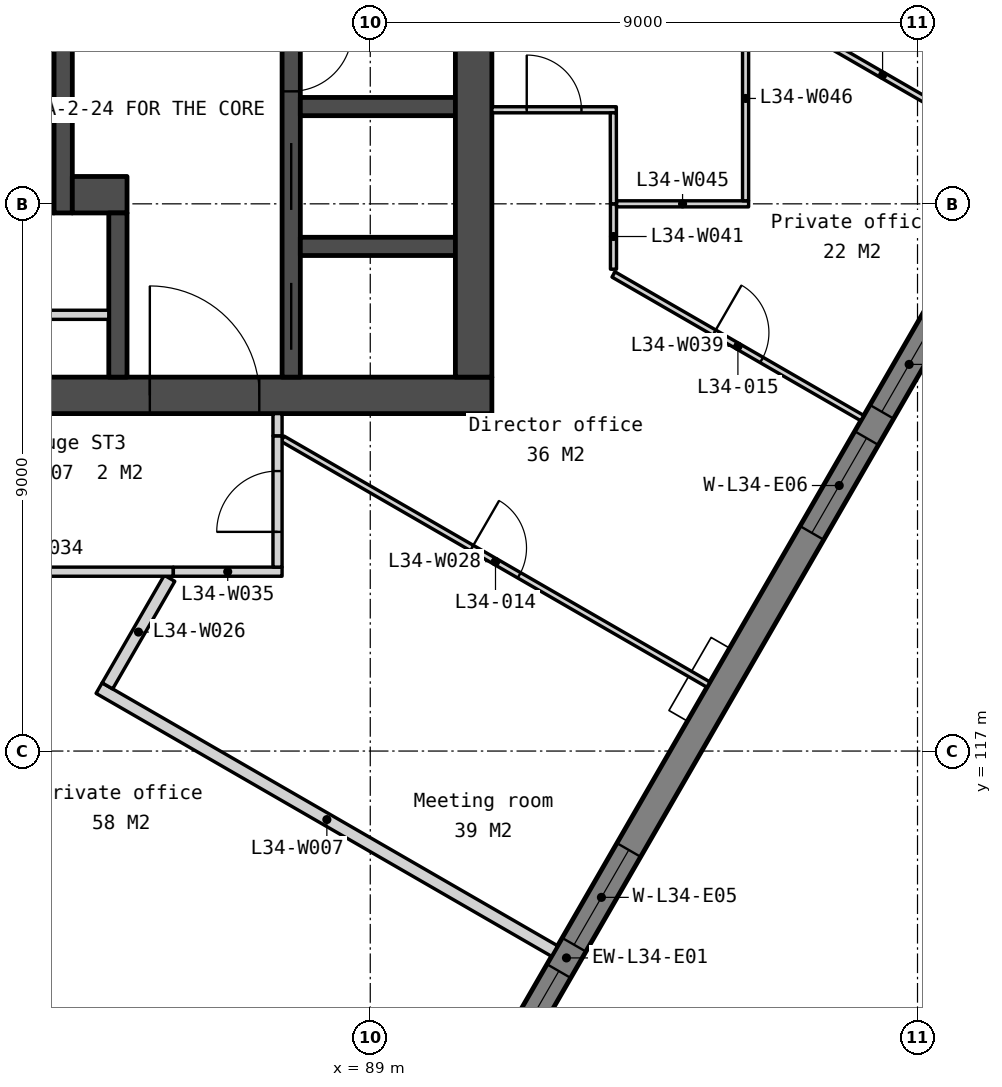
"""IFC4 building model, lengths in metres.
Left out: names, types, materials, properties, quantities, classifications, styles, units other than length and angle.
Written with IfcOpenShell. Run it as: python <this file> out.ifc"""

import sys

from ifc_helpers import new_model, si_unit, direction, frame, frame_2d, origin, place, context, subcontext, project, spatial, polyline, rectangle, outline, extrude, element, fill, save


model = new_model("IFC4")
c1 = context("Model", 3, precision=1e-05, world=origin(), true_north=direction((0.0, 1.0)))
c2 = subcontext(c1, "Body", "Model", "MODEL_VIEW")
j1 = project(units=[si_unit("LENGTHUNIT", "METRE"), si_unit("PLANEANGLEUNIT", "RADIAN")], contexts=[c1])
p1 = place(None, origin())
s1 = spatial("IfcSite", under=j1, at=p1, CompositionType="ELEMENT")
p2 = place(p1, origin())
s2 = spatial("IfcBuilding", under=s1, at=p2, CompositionType="ELEMENT")
p3 = place(p2, frame((0.0, 0.0, 136.4)))
s3 = spatial("IfcBuildingStorey", under=s2, at=p3, CompositionType="ELEMENT", Elevation=136.4)
p4 = place(p3, frame((69.0, 122.85, 0.0), z_axis=(0.0, 0.0, 1.0), x_axis=(1.0, 0.0, 0.0)))
e1 = element("IfcWall", 1, at=p4, inside=s3, PredefinedType="SOLIDWALL", context=c2, shape_type="SweptSolid", body=[
    extrude(rectangle(XDim=22.0, YDim=0.6, at=frame_2d((11.0, 0.0))), origin(), (0.0, 0.0, 1.0), 3.75),
])
p5 = place(p4, frame((16.375, 0.0, 0.0)))
e2 = element("IfcOpeningElement", 2, at=p5, cuts=e1, PredefinedType="OPENING", context=c2, shape_type="SweptSolid", body=[
    extrude(rectangle(XDim=1.8, YDim=2.1, at=frame_2d((0.9, 1.05))), frame((0.0, 0.31, 0.0), z_axis=(0.0, -1.0, 0.0), x_axis=(1.0, 0.0, 0.0)), (0.0, 0.0, 1.0), 0.62),
])
p6 = place(p4, frame((3.825, 0.0, 0.0)))
e3 = element("IfcOpeningElement", 3, at=p6, cuts=e1, PredefinedType="OPENING", context=c2, shape_type="SweptSolid", body=[
    extrude(rectangle(XDim=1.8, YDim=2.1, at=frame_2d((0.9, 1.05))), frame((0.0, 0.31, 0.0), z_axis=(0.0, -1.0, 0.0), x_axis=(1.0, 0.0, 0.0)), (0.0, 0.0, 1.0), 0.62),
])
p7 = place(p4, frame((12.85, 0.0, 0.0)))
e4 = element("IfcOpeningElement", 4, at=p7, cuts=e1, PredefinedType="OPENING", context=c2, shape_type="SweptSolid", body=[
    extrude(rectangle(XDim=1.5, YDim=2.1, at=frame_2d((0.75, 1.05))), frame((0.0, 0.31, 0.0), z_axis=(0.0, -1.0, 0.0), x_axis=(1.0, 0.0, 0.0)), (0.0, 0.0, 1.0), 0.62),
])
p8 = place(p3, frame((82.9, 126.15, 0.0), z_axis=(0.0, 0.0, 1.0), x_axis=(1.0, 0.0, 0.0)))
e5 = element("IfcWall", 5, at=p8, inside=s3, PredefinedType="SOLIDWALL", context=c2, shape_type="SweptSolid", body=[
    extrude(rectangle(XDim=0.9, YDim=0.6, at=frame_2d((0.45, 0.0))), origin(), (0.0, 0.0, 1.0), 3.75),
])
p9 = place(p3, frame((83.35, 124.175, 0.0), z_axis=(0.0, 0.0, 1.0), x_axis=(1.0, 0.0, 0.0)))
e6 = element("IfcWall", 6, at=p9, inside=s3, PredefinedType="PARTITIONING", context=c2, shape_type="SweptSolid", body=[
    extrude(rectangle(XDim=1.35, YDim=0.15, at=frame_2d((0.675, 0.0))), origin(), (0.0, 0.0, 1.0), 3.75),
])
p10 = place(p3, frame((83.95, 133.95, 0.0), z_axis=(0.0, 0.0, 1.0), x_axis=(0.0, -1.0, 0.0)))
e7 = element("IfcWall", 7, at=p10, inside=s3, PredefinedType="SOLIDWALL", context=c2, shape_type="SweptSolid", body=[
    extrude(rectangle(XDim=8.1, YDim=0.3, at=frame_2d((4.05, 0.0))), origin(), (0.0, 0.0, 1.0), 3.75),
])
p11 = place(p3, frame((84.1, 126.15, 0.0), z_axis=(0.0, 0.0, 1.0), x_axis=(1.0, 0.0, 0.0)))
e8 = element("IfcWall", 8, at=p11, inside=s3, PredefinedType="SOLIDWALL", context=c2, shape_type="SweptSolid", body=[
    extrude(rectangle(XDim=0.9, YDim=0.6, at=frame_2d((0.45, 0.0))), origin(), (0.0, 0.0, 1.0), 3.75),
])
p12 = place(p3, frame((84.85, 125.85, 0.0), z_axis=(0.0, 0.0, 1.0), x_axis=(0.0, -1.0, 0.0)))
e9 = element("IfcWall", 9, at=p12, inside=s3, PredefinedType="SOLIDWALL", context=c2, shape_type="SweptSolid", body=[
    extrude(rectangle(XDim=2.7, YDim=0.3, at=frame_2d((1.35, 0.0))), origin(), (0.0, 0.0, 1.0), 3.75),
])
p13 = place(p3, frame((87.7, 133.95, 0.0), z_axis=(0.0, 0.0, 1.0), x_axis=(0.0, -1.0, 0.0)))
e10 = element("IfcWall", 10, at=p13, inside=s3, PredefinedType="SOLIDWALL", context=c2, shape_type="SweptSolid", body=[
    extrude(rectangle(XDim=10.8, YDim=0.3, at=frame_2d((5.4, 0.0))), origin(), (0.0, 0.0, 1.0), 3.75),
])
p14 = place(p13, frame((6.95, 0.0, 0.0)))
e11 = element("IfcOpeningElement", 11, at=p14, cuts=e10, PredefinedType="OPENING", context=c2, shape_type="SweptSolid", body=[
    extrude(rectangle(XDim=1.1, YDim=2.1, at=frame_2d((0.55, 1.05))), frame((0.0, 0.16, 0.0), z_axis=(0.0, -1.0, 0.0), x_axis=(1.0, 0.0, 0.0)), (0.0, 0.0, 1.0), 0.32),
])
p15 = place(p13, frame((5.1, 0.0, 0.0)))
e12 = element("IfcOpeningElement", 12, at=p15, cuts=e10, PredefinedType="OPENING", context=c2, shape_type="SweptSolid", body=[
    extrude(rectangle(XDim=1.0, YDim=2.1, at=frame_2d((0.5, 1.05))), frame((0.0, 0.16, 0.0), z_axis=(0.0, -1.0, 0.0), x_axis=(1.0, 0.0, 0.0)), (0.0, 0.0, 1.0), 0.32),
])
p16 = place(p13, frame((9.25, 0.0, 0.0)))
e13 = element("IfcOpeningElement", 13, at=p16, cuts=e10, PredefinedType="OPENING", context=c2, shape_type="SweptSolid", body=[
    extrude(rectangle(XDim=1.1, YDim=2.1, at=frame_2d((0.55, 1.05))), frame((0.0, 0.16, 0.0), z_axis=(0.0, -1.0, 0.0), x_axis=(1.0, 0.0, 0.0)), (0.0, 0.0, 1.0), 0.32),
])
for number, where, z_axis, x_axis in (
    (14, (87.85, 127.6, 0.0), (0.0, 0.0, 1.0), (1.0, 0.0, 0.0)),
    (15, (87.85, 125.3, 0.0), (0.0, 0.0, 1.0), (1.0, 0.0, 0.0)),
):
    element("IfcWall", number, at=place(p3, frame(where, z_axis=z_axis, x_axis=x_axis)), inside=s3, PredefinedType="SOLIDWALL", context=c2, shape_type="SweptSolid", body=[
        extrude(rectangle(XDim=2.55, YDim=0.3, at=frame_2d((1.275, 0.0))), origin(), (0.0, 0.0, 1.0), 3.75),
    ])
p17 = place(p3, frame((90.7, 133.95, 0.0), z_axis=(0.0, 0.0, 1.0), x_axis=(0.0, -1.0, 0.0)))
e16 = element("IfcWall", 16, at=p17, inside=s3, PredefinedType="SOLIDWALL", context=c2, shape_type="SweptSolid", body=[
    extrude(rectangle(XDim=10.8, YDim=0.6, at=frame_2d((5.4, 0.0))), origin(), (0.0, 0.0, 1.0), 3.75),
])
p18 = place(p3, frame((82.105, 96.067, -0.15), z_axis=(0.0, 0.0, 1.0), x_axis=(0.499997369791, 0.866026922331, 0.0)))
e17 = element("IfcWall", 17, at=p18, inside=s3, PredefinedType="SOLIDWALL", context=c2, shape_type="SweptSolid", body=[
    extrude(outline(polyline([(40.486, 0.0), (40.486, 3.9), (0.0, 3.9), (0.0, 0.0), (40.486, 0.0)])), frame((0.0, 0.225, 0.0), z_axis=(0.0, -1.0, 0.0), x_axis=(1.0, 0.0, 0.0)), (0.0, 0.0, 1.0), 0.45),
])
p19 = place(p18, frame((0.87, 0.0, 0.95)))
e18 = element("IfcOpeningElement", 18, at=p19, cuts=e17, PredefinedType="OPENING", context=c2, shape_type="SweptSolid", body=[
    extrude(rectangle(XDim=1.2, YDim=2.2, at=frame_2d((0.6, 1.1))), frame((0.0, 0.235, 0.0), z_axis=(0.0, -1.0, 0.0), x_axis=(1.0, 0.0, 0.0)), (0.0, 0.0, 1.0), 0.47),
])
p20 = place(p18, frame((8.072, 0.0, 0.95)))
e19 = element("IfcOpeningElement", 19, at=p20, cuts=e17, PredefinedType="OPENING", context=c2, shape_type="SweptSolid", body=[
    extrude(rectangle(XDim=1.8, YDim=2.2, at=frame_2d((0.9, 1.1))), frame((0.0, 0.235, 0.0), z_axis=(0.0, -1.0, 0.0), x_axis=(1.0, 0.0, 0.0)), (0.0, 0.0, 1.0), 0.47),
])
p21 = place(p18, frame((10.372, 0.0, 0.95)))
e20 = element("IfcOpeningElement", 20, at=p21, cuts=e17, PredefinedType="OPENING", context=c2, shape_type="SweptSolid", body=[
    extrude(rectangle(XDim=1.8, YDim=2.2, at=frame_2d((0.9, 1.1))), frame((0.0, 0.235, 0.0), z_axis=(0.0, -1.0, 0.0), x_axis=(1.0, 0.0, 0.0)), (0.0, 0.0, 1.0), 0.47),
])
p22 = place(p18, frame((18.193, 0.0, 0.95)))
e21 = element("IfcOpeningElement", 21, at=p22, cuts=e17, PredefinedType="OPENING", context=c2, shape_type="SweptSolid", body=[
    extrude(rectangle(XDim=1.8, YDim=2.2, at=frame_2d((0.9, 1.1))), frame((0.0, 0.235, 0.0), z_axis=(0.0, -1.0, 0.0), x_axis=(1.0, 0.0, 0.0)), (0.0, 0.0, 1.0), 0.47),
])
p23 = place(p18, frame((20.493, 0.0, 0.95)))
e22 = element("IfcOpeningElement", 22, at=p23, cuts=e17, PredefinedType="OPENING", context=c2, shape_type="SweptSolid", body=[
    extrude(rectangle(XDim=1.8, YDim=2.2, at=frame_2d((0.9, 1.1))), frame((0.0, 0.235, 0.0), z_axis=(0.0, -1.0, 0.0), x_axis=(1.0, 0.0, 0.0)), (0.0, 0.0, 1.0), 0.47),
])
p24 = place(p18, frame((28.315, 0.0, 0.95)))
e23 = element("IfcOpeningElement", 23, at=p24, cuts=e17, PredefinedType="OPENING", context=c2, shape_type="SweptSolid", body=[
    extrude(rectangle(XDim=1.8, YDim=2.2, at=frame_2d((0.9, 1.1))), frame((0.0, 0.235, 0.0), z_axis=(0.0, -1.0, 0.0), x_axis=(1.0, 0.0, 0.0)), (0.0, 0.0, 1.0), 0.47),
])
p25 = place(p18, frame((30.615, 0.0, 0.95)))
e24 = element("IfcOpeningElement", 24, at=p25, cuts=e17, PredefinedType="OPENING", context=c2, shape_type="SweptSolid", body=[
    extrude(rectangle(XDim=1.8, YDim=2.2, at=frame_2d((0.9, 1.1))), frame((0.0, 0.235, 0.0), z_axis=(0.0, -1.0, 0.0), x_axis=(1.0, 0.0, 0.0)), (0.0, 0.0, 1.0), 0.47),
])
p26 = place(p18, frame((38.417, 0.0, 0.95)))
e25 = element("IfcOpeningElement", 25, at=p26, cuts=e17, PredefinedType="OPENING", context=c2, shape_type="SweptSolid", body=[
    extrude(rectangle(XDim=1.2, YDim=2.2, at=frame_2d((0.6, 1.1))), frame((0.0, 0.235, 0.0), z_axis=(0.0, -1.0, 0.0), x_axis=(1.0, 0.0, 0.0)), (0.0, 0.0, 1.0), 0.47),
])
p27 = place(p3, frame((84.541, 118.035, 0.0), z_axis=(0.0, 0.0, 1.0), x_axis=(0.866023427642, -0.500003422764, 0.0)))
e26 = element("IfcWall", 26, at=p27, inside=s3, PredefinedType="PARTITIONING", context=c2, shape_type="SweptSolid", body=[
    extrude(rectangle(XDim=8.65, YDim=0.2, at=frame_2d((4.325, 0.0))), origin(), (0.0, 0.0, 1.0), 3.75),
])
p28 = place(p3, frame((81.308, 114.058, 0.0), z_axis=(0.0, 0.0, 1.0), x_axis=(0.866017555821, -0.500013592824, 0.0)))
e27 = element("IfcWall", 27, at=p28, inside=s3, PredefinedType="PARTITIONING", context=c2, shape_type="SweptSolid", body=[
    extrude(rectangle(XDim=9.461, YDim=0.2, at=frame_2d((4.73, 0.0))), origin(), (0.0, 0.0, 1.0), 3.75),
])
p29 = place(p3, frame((84.677, 118.072, 0.0), z_axis=(0.0, 0.0, 1.0), x_axis=(0.500018862428, 0.866014513283, 0.0)))
e28 = element("IfcWall", 28, at=p29, inside=s3, PredefinedType="PARTITIONING", context=c2, shape_type="SweptSolid", body=[
    extrude(rectangle(XDim=2.044, YDim=0.2, at=frame_2d((1.022, 0.0))), origin(), (0.0, 0.0, 1.0), 3.75),
])
p30 = place(p3, frame((87.557, 122.137, 0.0), z_axis=(0.0, 0.0, 1.0), x_axis=(0.866029768103, -0.499992440702, 0.0)))
e29 = element("IfcWall", 29, at=p30, inside=s3, PredefinedType="PARTITIONING", context=c2, shape_type="SweptSolid", body=[
    extrude(rectangle(XDim=8.089, YDim=0.1, at=frame_2d((4.044, 0.0))), origin(), (0.0, 0.0, 1.0), 3.75),
])
p31 = place(p30, frame((3.594, 0.0, 0.0)))
e30 = element("IfcOpeningElement", 30, at=p31, cuts=e29, PredefinedType="OPENING", context=c2, shape_type="SweptSolid", body=[
    extrude(rectangle(XDim=0.9, YDim=2.1, at=frame_2d((0.45, 1.05))), frame((0.0, 0.06, 0.0), z_axis=(0.0, -1.0, 0.0), x_axis=(1.0, 0.0, 0.0)), (0.0, 0.0, 1.0), 0.12),
])
p32 = place(p3, frame((81.275, 119.95, 0.0), z_axis=(0.0, 0.0, 1.0), x_axis=(1.0, 0.0, 0.0)))
e31 = element("IfcWall", 31, at=p32, inside=s3, PredefinedType="PARTITIONING", context=c2, shape_type="SweptSolid", body=[
    extrude(rectangle(XDim=4.487, YDim=0.15, at=frame_2d((2.243, 0.0))), origin(), (0.0, 0.0, 1.0), 3.75),
])
p33 = place(p3, frame((85.762, 119.95, 0.0), z_axis=(0.0, 0.0, 1.0), x_axis=(1.0, 0.0, 0.0)))
e32 = element("IfcWall", 32, at=p33, inside=s3, PredefinedType="PARTITIONING", context=c2, shape_type="SweptSolid", body=[
    extrude(rectangle(XDim=1.788, YDim=0.15, at=frame_2d((0.894, 0.0))), origin(), (0.0, 0.0, 1.0), 3.75),
])
p34 = place(p3, frame((87.475, 120.025, 0.0), z_axis=(0.0, 0.0, 1.0), x_axis=(0.0, 1.0, 0.0)))
e33 = element("IfcWall", 33, at=p34, inside=s3, PredefinedType="PARTITIONING", context=c2, shape_type="SweptSolid", body=[
    extrude(rectangle(XDim=2.16, YDim=0.15, at=frame_2d((1.08, 0.0))), origin(), (0.0, 0.0, 1.0), 3.75),
])
p35 = place(p34, frame((0.58, 0.0, 0.0)))
e34 = element("IfcOpeningElement", 34, at=p35, cuts=e33, PredefinedType="OPENING", context=c2, shape_type="SweptSolid", body=[
    extrude(rectangle(XDim=1.0, YDim=2.1, at=frame_2d((0.5, 1.05))), frame((0.0, 0.085, 0.0), z_axis=(0.0, -1.0, 0.0), x_axis=(1.0, 0.0, 0.0)), (0.0, 0.0, 1.0), 0.17),
])
p36 = place(p3, frame((93.0, 124.839, 0.0), z_axis=(0.0, 0.0, 1.0), x_axis=(0.866028145587, -0.499995251029, 0.0)))
e35 = element("IfcWall", 35, at=p36, inside=s3, PredefinedType="PARTITIONING", context=c2, shape_type="SweptSolid", body=[
    extrude(rectangle(XDim=4.726, YDim=0.1, at=frame_2d((2.363, 0.0))), origin(), (0.0, 0.0, 1.0), 3.75),
])
p37 = place(p36, frame((1.913, 0.0, 0.0)))
e36 = element("IfcOpeningElement", 36, at=p37, cuts=e35, PredefinedType="OPENING", context=c2, shape_type="SweptSolid", body=[
    extrude(rectangle(XDim=0.9, YDim=2.1, at=frame_2d((0.45, 1.05))), frame((0.0, 0.06, 0.0), z_axis=(0.0, -1.0, 0.0), x_axis=(1.0, 0.0, 0.0)), (0.0, 0.0, 1.0), 0.12),
])
p38 = place(p3, frame((87.475, 122.185, 0.0), z_axis=(0.0, 0.0, 1.0), x_axis=(0.0, 1.0, 0.0)))
e37 = element("IfcWall", 37, at=p38, inside=s3, PredefinedType="PARTITIONING", context=c2, shape_type="SweptSolid", body=[
    extrude(rectangle(XDim=0.365, YDim=0.15, at=frame_2d((0.183, 0.0))), origin(), (0.0, 0.0, 1.0), 3.75),
])
p39 = place(p3, frame((93.0, 124.925, 0.0), z_axis=(0.0, 0.0, 1.0), x_axis=(0.0, 1.0, 0.0)))
e38 = element("IfcWall", 38, at=p39, inside=s3, PredefinedType="PARTITIONING", context=c2, shape_type="SweptSolid", body=[
    extrude(rectangle(XDim=1.075, YDim=0.1, at=frame_2d((0.537, 0.0))), origin(), (0.0, 0.0, 1.0), 3.75),
])
p40 = place(p3, frame((93.05, 126.0, 0.0), z_axis=(0.0, 0.0, 1.0), x_axis=(1.0, 0.0, 0.0)))
e39 = element("IfcWall", 39, at=p40, inside=s3, PredefinedType="PARTITIONING", context=c2, shape_type="SweptSolid", body=[
    extrude(rectangle(XDim=2.172, YDim=0.1, at=frame_2d((1.086, 0.0))), origin(), (0.0, 0.0, 1.0), 3.75),
])
p41 = place(p3, frame((95.172, 126.05, 0.0), z_axis=(0.0, 0.0, 1.0), x_axis=(0.0, 1.0, 0.0)))
e40 = element("IfcWall", 40, at=p41, inside=s3, PredefinedType="PARTITIONING", context=c2, shape_type="SweptSolid", body=[
    extrude(rectangle(XDim=3.367, YDim=0.1, at=frame_2d((1.683, 0.0))), origin(), (0.0, 0.0, 1.0), 3.75),
])
p42 = place(p3, frame((95.233, 129.382, 0.0), z_axis=(0.0, 0.0, 1.0), x_axis=(0.866041859802, -0.499971496258, 0.0)))
e41 = element("IfcWall", 41, at=p42, inside=s3, PredefinedType="PARTITIONING", context=c2, shape_type="SweptSolid", body=[
    extrude(rectangle(XDim=5.063, YDim=0.1, at=frame_2d((2.532, 0.0))), origin(), (0.0, 0.0, 1.0), 3.75),
])
p43 = place(p3, frame((91.0, 127.547, 0.0), z_axis=(0.0, 0.0, 1.0), x_axis=(1.0, 0.0, 0.0)))
e42 = element("IfcWall", 42, at=p43, inside=s3, PredefinedType="PARTITIONING", context=c2, shape_type="SweptSolid", body=[
    extrude(rectangle(XDim=2.047, YDim=0.1, at=frame_2d((1.023, 0.0))), origin(), (0.0, 0.0, 1.0), 3.75),
])
p44 = place(p43, frame((0.573, 0.0, 0.0)))
e43 = element("IfcOpeningElement", 43, at=p44, cuts=e42, PredefinedType="OPENING", context=c2, shape_type="SweptSolid", body=[
    extrude(rectangle(XDim=0.9, YDim=2.1, at=frame_2d((0.45, 1.05))), frame((0.0, 0.06, 0.0), z_axis=(0.0, -1.0, 0.0), x_axis=(1.0, 0.0, 0.0)), (0.0, 0.0, 1.0), 0.12),
])
p45 = place(p3, frame((93.0, 126.0, 0.0), z_axis=(0.0, 0.0, 1.0), x_axis=(-0.001956943415, 0.999998085184, 0.0)))
e44 = element("IfcWall", 44, at=p45, inside=s3, PredefinedType="PARTITIONING", context=c2, shape_type="SweptSolid", body=[
    extrude(rectangle(XDim=1.497, YDim=0.1, at=frame_2d((0.749, 0.0))), origin(), (0.0, 0.0, 1.0), 3.75),
])
p46 = place(p14, origin())
e45 = element("IfcDoor", 45, at=p46, inside=s3, OperationType="SLIDING_TO_LEFT", PredefinedType="DOOR", context=c2, shape_type="SweptSolid", body=[
    extrude(rectangle(XDim=1.1, YDim=2.1, at=frame_2d((0.55, 1.05))), frame((0.0, 0.025, 0.0), z_axis=(0.0, -1.0, 0.0), x_axis=(1.0, 0.0, 0.0)), (0.0, 0.0, 1.0), 0.05),
])
fill(e11, e45)
p47 = place(p5, origin())
e46 = element("IfcDoor", 46, at=p47, inside=s3, OperationType="DOUBLE_DOOR_DOUBLE_SWING", PredefinedType="DOOR", context=c2, shape_type="SweptSolid", body=[
    extrude(rectangle(XDim=1.8, YDim=2.1, at=frame_2d((0.9, 1.05))), frame((0.0, 0.025, 0.0), z_axis=(0.0, -1.0, 0.0), x_axis=(1.0, 0.0, 0.0)), (0.0, 0.0, 1.0), 0.05),
])
fill(e2, e46)
p48 = place(p15, origin())
e47 = element("IfcDoor", 47, at=p48, inside=s3, OperationType="SINGLE_SWING_LEFT", PredefinedType="DOOR", context=c2, shape_type="SweptSolid", body=[
    extrude(rectangle(XDim=1.0, YDim=2.1, at=frame_2d((0.5, 1.05))), frame((0.0, 0.025, 0.0), z_axis=(0.0, -1.0, 0.0), x_axis=(1.0, 0.0, 0.0)), (0.0, 0.0, 1.0), 0.05),
])
fill(e12, e47)
p49 = place(p16, origin())
e48 = element("IfcDoor", 48, at=p49, inside=s3, OperationType="SLIDING_TO_LEFT", PredefinedType="DOOR", context=c2, shape_type="SweptSolid", body=[
    extrude(rectangle(XDim=1.1, YDim=2.1, at=frame_2d((0.55, 1.05))), frame((0.0, 0.025, 0.0), z_axis=(0.0, -1.0, 0.0), x_axis=(1.0, 0.0, 0.0)), (0.0, 0.0, 1.0), 0.05),
])
fill(e13, e48)
p50 = place(p22, origin())
e49 = element("IfcWindow", 49, at=p50, inside=s3, PartitioningType="SINGLE_PANEL", PredefinedType="WINDOW", context=c2, shape_type="SweptSolid", body=[
    extrude(rectangle(XDim=1.8, YDim=2.2, at=frame_2d((0.9, 1.1))), frame((0.0, 0.03, 0.0), z_axis=(0.0, -1.0, 0.0), x_axis=(1.0, 0.0, 0.0)), (0.0, 0.0, 1.0), 0.06),
])
fill(e21, e49)
p51 = place(p23, origin())
e50 = element("IfcWindow", 50, at=p51, inside=s3, PartitioningType="SINGLE_PANEL", PredefinedType="WINDOW", context=c2, shape_type="SweptSolid", body=[
    extrude(rectangle(XDim=1.8, YDim=2.2, at=frame_2d((0.9, 1.1))), frame((0.0, 0.03, 0.0), z_axis=(0.0, -1.0, 0.0), x_axis=(1.0, 0.0, 0.0)), (0.0, 0.0, 1.0), 0.06),
])
fill(e22, e50)
p52 = place(p24, origin())
e51 = element("IfcWindow", 51, at=p52, inside=s3, PartitioningType="SINGLE_PANEL", PredefinedType="WINDOW", context=c2, shape_type="SweptSolid", body=[
    extrude(rectangle(XDim=1.8, YDim=2.2, at=frame_2d((0.9, 1.1))), frame((0.0, 0.03, 0.0), z_axis=(0.0, -1.0, 0.0), x_axis=(1.0, 0.0, 0.0)), (0.0, 0.0, 1.0), 0.06),
])
fill(e23, e51)
p53 = place(p25, origin())
e52 = element("IfcWindow", 52, at=p53, inside=s3, PartitioningType="SINGLE_PANEL", PredefinedType="WINDOW", context=c2, shape_type="SweptSolid", body=[
    extrude(rectangle(XDim=1.8, YDim=2.2, at=frame_2d((0.9, 1.1))), frame((0.0, 0.03, 0.0), z_axis=(0.0, -1.0, 0.0), x_axis=(1.0, 0.0, 0.0)), (0.0, 0.0, 1.0), 0.06),
])
fill(e24, e52)
p54 = place(p44, origin())
e53 = element("IfcDoor", 53, at=p54, inside=s3, OperationType="SINGLE_SWING_LEFT", PredefinedType="DOOR", context=c2, shape_type="SweptSolid", body=[
    extrude(rectangle(XDim=0.9, YDim=2.1, at=frame_2d((0.45, 1.05))), frame((0.0, 0.025, 0.0), z_axis=(0.0, -1.0, 0.0), x_axis=(1.0, 0.0, 0.0)), (0.0, 0.0, 1.0), 0.05),
])
fill(e43, e53)
p55 = place(p35, origin())
e54 = element("IfcDoor", 54, at=p55, inside=s3, OperationType="SINGLE_SWING_LEFT", PredefinedType="DOOR", context=c2, shape_type="SweptSolid", body=[
    extrude(rectangle(XDim=1.0, YDim=2.1, at=frame_2d((0.5, 1.05))), frame((0.0, 0.025, 0.0), z_axis=(0.0, -1.0, 0.0), x_axis=(1.0, 0.0, 0.0)), (0.0, 0.0, 1.0), 0.05),
])
fill(e34, e54)
p56 = place(p31, origin())
e55 = element("IfcDoor", 55, at=p56, inside=s3, OperationType="SINGLE_SWING_LEFT", PredefinedType="DOOR", context=c2, shape_type="SweptSolid", body=[
    extrude(rectangle(XDim=0.9, YDim=2.1, at=frame_2d((0.45, 1.05))), frame((0.0, 0.025, 0.0), z_axis=(0.0, -1.0, 0.0), x_axis=(1.0, 0.0, 0.0)), (0.0, 0.0, 1.0), 0.05),
])
fill(e30, e55)
p57 = place(p37, origin())
e56 = element("IfcDoor", 56, at=p57, inside=s3, OperationType="SINGLE_SWING_LEFT", PredefinedType="DOOR", context=c2, shape_type="SweptSolid", body=[
    extrude(rectangle(XDim=0.9, YDim=2.1, at=frame_2d((0.45, 1.05))), frame((0.0, 0.025, 0.0), z_axis=(0.0, -1.0, 0.0), x_axis=(1.0, 0.0, 0.0)), (0.0, 0.0, 1.0), 0.05),
])
fill(e36, e56)
save(model, sys.argv[1])
